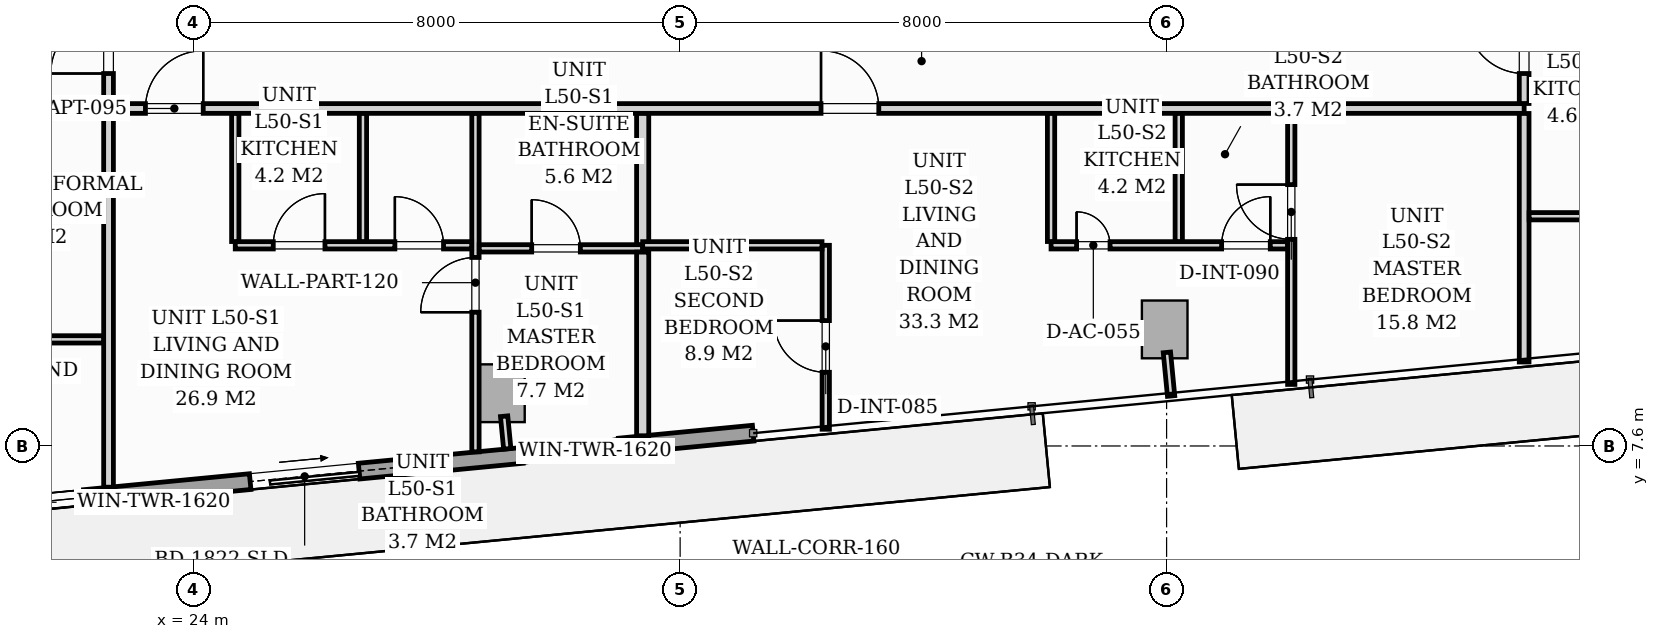
"""IFC4 building model, lengths in metres.
Left out: names, types, materials, properties, quantities, classifications, styles, units other than length and angle.
Written with IfcOpenShell. Run it as: python <this file> out.ifc"""

import sys

from ifc_helpers import new_model, si_unit, direction, frame, frame_2d, origin, origin_2d, place, context, subcontext, project, spatial, rectangle, extrude, source, transform, mapped, element, fill, save


model = new_model("IFC4")
c1 = context("Model", 3, precision=1e-05, world=origin(), true_north=direction((0.0, 1.0)))
c2 = subcontext(c1, "Body", "Model", "MODEL_VIEW")
j1 = project(units=[si_unit("LENGTHUNIT", "METRE"), si_unit("PLANEANGLEUNIT", "RADIAN")], contexts=[c1])
p1 = place(None, origin())
s1 = spatial("IfcSite", under=j1, at=p1, CompositionType="ELEMENT")
p2 = place(p1, origin())
s2 = spatial("IfcBuilding", under=s1, at=p2, CompositionType="ELEMENT")
p3 = place(p2, frame((0.0, 0.0, 176.2)))
s3 = spatial("IfcBuildingStorey", under=s2, at=p3, CompositionType="ELEMENT", Elevation=176.2)
m1 = source(origin(), c2, "Body", "SweptSolid", [
    extrude(rectangle(XDim=0.75, YDim=0.95, at=origin_2d()), origin(), (0.0, 0.0, 1.0), 3.196),
])
for number, where, z_axis, x_axis in (
    (1, (29.069, 8.467, 0.002), (0.0, 0.0, 1.0), (0.995, 0.096, 0.0)),
    (2, (39.969, 9.517, 0.002), (0.0, 0.0, 1.0), (0.995, 0.096, 0.0)),
):
    element("IfcColumn", number, at=place(p3, frame(where, z_axis=z_axis, x_axis=x_axis)), inside=s3, PredefinedType="COLUMN", context=c2, shape_type="MappedRepresentation", body=[
        mapped(m1, transform((0.0, 0.0, 0.0), scale=1.0)),
    ])
p4 = place(p3, frame((33.201, 7.81, 0.0), z_axis=(0.0, 0.0, 1.0), x_axis=(-0.995397074604, -0.095836652014, 0.0)))
e3 = element("IfcWall", 3, at=p4, inside=s3, PredefinedType="STANDARD", context=c2, shape_type="SweptSolid", body=[
    extrude(rectangle(XDim=16.1, YDim=0.26, at=frame_2d((8.05, 0.0))), origin(), (0.0, 0.0, 1.0), 2.94),
])
p5 = place(p4, frame((6.51, 0.0, 0.0)))
e4 = element("IfcOpeningElement", 4, at=p5, cuts=e3, PredefinedType="OPENING", context=c2, shape_type="SweptSolid", body=[
    extrude(rectangle(XDim=1.8, YDim=2.06, at=frame_2d((0.9, 1.03))), frame((0.0, 0.14, 0.0), z_axis=(0.0, -1.0, 0.0), x_axis=(1.0, 0.0, 0.0)), (0.0, 0.0, 1.0), 0.28),
])
p6 = place(p4, frame((11.05, 0.0, 0.65)))
e5 = element("IfcOpeningElement", 5, at=p6, cuts=e3, PredefinedType="OPENING", context=c2, shape_type="SweptSolid", body=[
    extrude(rectangle(XDim=1.6, YDim=1.5, at=frame_2d((0.8, 0.75))), frame((0.0, 0.14, 0.0), z_axis=(0.0, -1.0, 0.0), x_axis=(1.0, 0.0, 0.0)), (0.0, 0.0, 1.0), 0.28),
])
p7 = place(p4, frame((2.213, 0.0, 0.75)))
e6 = element("IfcOpeningElement", 6, at=p7, cuts=e3, PredefinedType="OPENING", context=c2, shape_type="SweptSolid", body=[
    extrude(rectangle(XDim=1.6, YDim=1.5, at=frame_2d((0.8, 0.75))), frame((0.0, 0.14, 0.0), z_axis=(0.0, -1.0, 0.0), x_axis=(1.0, 0.0, 0.0)), (0.0, 0.0, 1.0), 0.28),
])
p8 = place(p3, frame((22.6, 13.15, 0.0), z_axis=(0.0, 0.0, 1.0), x_axis=(1.0, 0.0, 0.0)))
e7 = element("IfcWall", 7, at=p8, inside=s3, PredefinedType="PARTITIONING", context=c2, shape_type="SweptSolid", body=[
    extrude(rectangle(XDim=23.28, YDim=0.16, at=frame_2d((11.64, 0.0))), origin(), (0.0, 0.0, 1.0), 2.94),
])
p9 = place(p8, frame((0.607, 0.0, 0.0)))
e8 = element("IfcOpeningElement", 8, at=p9, cuts=e7, PredefinedType="OPENING", context=c2, shape_type="SweptSolid", body=[
    extrude(rectangle(XDim=0.95, YDim=2.06, at=frame_2d((0.475, 1.03))), frame((0.0, 0.09, 0.0), z_axis=(0.0, -1.0, 0.0), x_axis=(1.0, 0.0, 0.0)), (0.0, 0.0, 1.0), 0.18),
])
p10 = place(p8, frame((11.717, 0.0, 0.0)))
e9 = element("IfcOpeningElement", 9, at=p10, cuts=e7, PredefinedType="OPENING", context=c2, shape_type="SweptSolid", body=[
    extrude(rectangle(XDim=0.95, YDim=2.06, at=frame_2d((0.475, 1.03))), frame((0.0, 0.09, 0.0), z_axis=(0.0, -1.0, 0.0), x_axis=(1.0, 0.0, 0.0)), (0.0, 0.0, 1.0), 0.18),
])
p11 = place(p3, frame((22.6, 6.922, 0.0), z_axis=(0.0, 0.0, 1.0), x_axis=(0.0, 1.0, 0.0)))
e10 = element("IfcWall", 10, at=p11, inside=s3, PredefinedType="PARTITIONING", context=c2, shape_type="SweptSolid", body=[
    extrude(rectangle(XDim=6.146, YDim=0.16, at=frame_2d((3.073, 0.0))), origin(), (0.0, 0.0, 1.0), 2.94),
])
p12 = place(p3, frame((22.6, 13.232, 0.0), z_axis=(0.0, 0.0, 1.0), x_axis=(0.0, 1.0, 0.0)))
e11 = element("IfcWall", 11, at=p12, inside=s3, PredefinedType="PARTITIONING", context=c2, shape_type="SweptSolid", body=[
    extrude(rectangle(XDim=11.649, YDim=0.16, at=frame_2d((5.824, 0.0))), origin(), (0.0, 0.0, 1.0), 2.94),
])
p13 = place(p12, frame((0.493, 0.0, 0.0)))
e12 = element("IfcOpeningElement", 12, at=p13, cuts=e11, PredefinedType="OPENING", context=c2, shape_type="SweptSolid", body=[
    extrude(rectangle(XDim=0.95, YDim=2.06, at=frame_2d((0.475, 1.03))), frame((0.0, 0.09, 0.0), z_axis=(0.0, -1.0, 0.0), x_axis=(1.0, 0.0, 0.0)), (0.0, 0.0, 1.0), 0.18),
])
p14 = place(p3, frame((45.88, 8.981, 0.0), z_axis=(0.0, 0.0, 1.0), x_axis=(0.0, 1.0, 0.0)))
e13 = element("IfcWall", 13, at=p14, inside=s3, PredefinedType="PARTITIONING", context=c2, shape_type="SweptSolid", body=[
    extrude(rectangle(XDim=4.087, YDim=0.16, at=frame_2d((2.043, 0.0))), origin(), (0.0, 0.0, 1.0), 2.94),
])
p15 = place(p3, frame((45.88, 13.232, 0.0), z_axis=(0.0, 0.0, 1.0), x_axis=(0.0, 1.0, 0.0)))
e14 = element("IfcWall", 14, at=p15, inside=s3, PredefinedType="PARTITIONING", context=c2, shape_type="SweptSolid", body=[
    extrude(rectangle(XDim=4.57, YDim=0.16, at=frame_2d((2.285, 0.0))), origin(), (0.0, 0.0, 1.0), 2.94),
])
p16 = place(p15, frame((0.493, 0.0, 0.0)))
e15 = element("IfcOpeningElement", 15, at=p16, cuts=e14, PredefinedType="OPENING", context=c2, shape_type="SweptSolid", body=[
    extrude(rectangle(XDim=0.95, YDim=2.06, at=frame_2d((0.475, 1.03))), frame((0.0, 0.09, 0.0), z_axis=(0.0, -1.0, 0.0), x_axis=(1.0, 0.0, 0.0)), (0.0, 0.0, 1.0), 0.18),
])
p17 = place(p3, frame((28.634, 7.503, 0.0), z_axis=(0.0, 0.0, 1.0), x_axis=(0.0, 1.0, 0.0)))
e16 = element("IfcWall", 16, at=p17, inside=s3, PredefinedType="PARTITIONING", context=c2, shape_type="SweptSolid", body=[
    extrude(rectangle(XDim=5.565, YDim=0.12, at=frame_2d((2.782, 0.0))), origin(), (0.0, 0.0, 1.0), 2.94),
])
p18 = place(p17, frame((2.297, 0.0, 0.0)))
e17 = element("IfcOpeningElement", 17, at=p18, cuts=e16, PredefinedType="OPENING", context=c2, shape_type="SweptSolid", body=[
    extrude(rectangle(XDim=0.9, YDim=2.05, at=frame_2d((0.45, 1.025))), frame((0.0, 0.07, 0.0), z_axis=(0.0, -1.0, 0.0), x_axis=(1.0, 0.0, 0.0)), (0.0, 0.0, 1.0), 0.14),
])
p19 = place(p3, frame((24.684, 10.9, 0.0), z_axis=(0.0, 0.0, 1.0), x_axis=(1.0, 0.0, 0.0)))
e18 = element("IfcWall", 18, at=p19, inside=s3, PredefinedType="PARTITIONING", context=c2, shape_type="SweptSolid", body=[
    extrude(rectangle(XDim=3.888, YDim=0.12, at=frame_2d((1.944, 0.0))), origin(), (0.0, 0.0, 1.0), 2.94),
])
p20 = place(p19, frame((0.625, 0.0, 0.0)))
e19 = element("IfcOpeningElement", 19, at=p20, cuts=e18, PredefinedType="OPENING", context=c2, shape_type="SweptSolid", body=[
    extrude(rectangle(XDim=0.85, YDim=2.05, at=frame_2d((0.425, 1.025))), frame((0.0, 0.07, 0.0), z_axis=(0.0, -1.0, 0.0), x_axis=(1.0, 0.0, 0.0)), (0.0, 0.0, 1.0), 0.14),
])
p21 = place(p19, frame((2.625, 0.0, 0.0)))
e20 = element("IfcOpeningElement", 20, at=p21, cuts=e18, PredefinedType="OPENING", context=c2, shape_type="SweptSolid", body=[
    extrude(rectangle(XDim=0.8, YDim=2.02, at=frame_2d((0.4, 1.01))), frame((0.0, 0.07, 0.0), z_axis=(0.0, -1.0, 0.0), x_axis=(1.0, 0.0, 0.0)), (0.0, 0.0, 1.0), 0.14),
])
for number, where, z_axis, x_axis in (
    (21, (26.784, 10.962, 0.0), (0.0, 0.0, 1.0), (0.0, 1.0, 0.0)),
    (22, (24.684, 10.962, 0.0), (0.0, 0.0, 1.0), (0.0, 1.0, 0.0)),
):
    element("IfcWall", number, at=place(p3, frame(where, z_axis=z_axis, x_axis=x_axis)), inside=s3, PredefinedType="PARTITIONING", context=c2, shape_type="SweptSolid", body=[
        extrude(rectangle(XDim=2.106, YDim=0.12, at=frame_2d((1.053, 0.0))), origin(), (0.0, 0.0, 1.0), 2.94),
    ])
p22 = place(p3, frame((28.696, 10.85, 0.0), z_axis=(0.0, 0.0, 1.0), x_axis=(1.0, 0.0, 0.0)))
e23 = element("IfcWall", 23, at=p22, inside=s3, PredefinedType="PARTITIONING", context=c2, shape_type="SweptSolid", body=[
    extrude(rectangle(XDim=2.688, YDim=0.12, at=frame_2d((1.344, 0.0))), origin(), (0.0, 0.0, 1.0), 2.94),
])
p23 = place(p22, frame((0.863, 0.0, 0.0)))
e24 = element("IfcOpeningElement", 24, at=p23, cuts=e23, PredefinedType="OPENING", context=c2, shape_type="SweptSolid", body=[
    extrude(rectangle(XDim=0.8, YDim=2.02, at=frame_2d((0.4, 1.01))), frame((0.0, 0.07, 0.0), z_axis=(0.0, -1.0, 0.0), x_axis=(1.0, 0.0, 0.0)), (0.0, 0.0, 1.0), 0.14),
])
p24 = place(p3, frame((31.384, 7.768, 0.0), z_axis=(0.0, 0.0, 1.0), x_axis=(0.0, 1.0, 0.0)))
e25 = element("IfcWall", 25, at=p24, inside=s3, PredefinedType="PARTITIONING", context=c2, shape_type="SweptSolid", body=[
    extrude(rectangle(XDim=3.02, YDim=0.2, at=frame_2d((1.51, 0.0))), origin(), (0.0, 0.0, 1.0), 2.94),
])
p25 = place(p3, frame((31.384, 10.912, 0.0), z_axis=(0.0, 0.0, 1.0), x_axis=(0.0, 1.0, 0.0)))
e26 = element("IfcWall", 26, at=p25, inside=s3, PredefinedType="PARTITIONING", context=c2, shape_type="SweptSolid", body=[
    extrude(rectangle(XDim=2.156, YDim=0.2, at=frame_2d((1.078, 0.0))), origin(), (0.0, 0.0, 1.0), 2.94),
])
p26 = place(p3, frame((42.05, 8.612, 0.0), z_axis=(0.0, 0.0, 1.0), x_axis=(0.0, 1.0, 0.0)))
e27 = element("IfcWall", 27, at=p26, inside=s3, PredefinedType="PARTITIONING", context=c2, shape_type="SweptSolid", body=[
    extrude(rectangle(XDim=4.456, YDim=0.12, at=frame_2d((2.228, 0.0))), origin(), (0.0, 0.0, 1.0), 2.94),
])
p27 = place(p26, frame((2.386, 0.0, 0.0)))
e28 = element("IfcOpeningElement", 28, at=p27, cuts=e27, PredefinedType="OPENING", context=c2, shape_type="SweptSolid", body=[
    extrude(rectangle(XDim=0.9, YDim=2.05, at=frame_2d((0.45, 1.025))), frame((0.0, 0.07, 0.0), z_axis=(0.0, -1.0, 0.0), x_axis=(1.0, 0.0, 0.0)), (0.0, 0.0, 1.0), 0.14),
])
p28 = place(p3, frame((38.1, 10.9, 0.0), z_axis=(0.0, 0.0, 1.0), x_axis=(1.0, 0.0, 0.0)))
e29 = element("IfcWall", 29, at=p28, inside=s3, PredefinedType="PARTITIONING", context=c2, shape_type="SweptSolid", body=[
    extrude(rectangle(XDim=3.888, YDim=0.12, at=frame_2d((1.944, 0.0))), origin(), (0.0, 0.0, 1.0), 2.94),
])
p29 = place(p28, frame((0.42, 0.0, 0.0)))
e30 = element("IfcOpeningElement", 30, at=p29, cuts=e29, PredefinedType="OPENING", context=c2, shape_type="SweptSolid", body=[
    extrude(rectangle(XDim=0.55, YDim=2.0, at=frame_2d((0.275, 1.0))), frame((0.0, 0.07, 0.0), z_axis=(0.0, -1.0, 0.0), x_axis=(1.0, 0.0, 0.0)), (0.0, 0.0, 1.0), 0.14),
])
p30 = place(p28, frame((2.805, 0.0, 0.0)))
e31 = element("IfcOpeningElement", 31, at=p30, cuts=e29, PredefinedType="OPENING", context=c2, shape_type="SweptSolid", body=[
    extrude(rectangle(XDim=0.8, YDim=2.02, at=frame_2d((0.4, 1.01))), frame((0.0, 0.07, 0.0), z_axis=(0.0, -1.0, 0.0), x_axis=(1.0, 0.0, 0.0)), (0.0, 0.0, 1.0), 0.14),
])
for number, where, z_axis, x_axis in (
    (32, (40.2, 10.962, 0.0), (0.0, 0.0, 1.0), (0.0, 1.0, 0.0)),
    (33, (38.1, 10.962, 0.0), (0.0, 0.0, 1.0), (0.0, 1.0, 0.0)),
):
    element("IfcWall", number, at=place(p3, frame(where, z_axis=z_axis, x_axis=x_axis)), inside=s3, PredefinedType="PARTITIONING", context=c2, shape_type="SweptSolid", body=[
        extrude(rectangle(XDim=2.106, YDim=0.12, at=frame_2d((1.053, 0.0))), origin(), (0.0, 0.0, 1.0), 2.94),
    ])
p31 = place(p3, frame((34.395, 7.875, 0.0), z_axis=(0.0, 0.0, 1.0), x_axis=(0.0, 1.0, 0.0)))
e34 = element("IfcWall", 34, at=p31, inside=s3, PredefinedType="PARTITIONING", context=c2, shape_type="SweptSolid", body=[
    extrude(rectangle(XDim=3.025, YDim=0.12, at=frame_2d((1.512, 0.0))), origin(), (0.0, 0.0, 1.0), 2.94),
])
p32 = place(p31, frame((0.937, 0.0, 0.0)))
e35 = element("IfcOpeningElement", 35, at=p32, cuts=e34, PredefinedType="OPENING", context=c2, shape_type="SweptSolid", body=[
    extrude(rectangle(XDim=0.85, YDim=2.05, at=frame_2d((0.425, 1.025))), frame((0.0, 0.07, 0.0), z_axis=(0.0, -1.0, 0.0), x_axis=(1.0, 0.0, 0.0)), (0.0, 0.0, 1.0), 0.14),
])
p33 = place(p3, frame((31.384, 10.9, 0.0), z_axis=(0.0, 0.0, 1.0), x_axis=(1.0, 0.0, 0.0)))
e36 = element("IfcWall", 36, at=p33, inside=s3, PredefinedType="PARTITIONING", context=c2, shape_type="SweptSolid", body=[
    extrude(rectangle(XDim=2.949, YDim=0.12, at=frame_2d((1.475, 0.0))), origin(), (0.0, 0.0, 1.0), 2.94),
])
p34 = place(p3, frame((14.447, 9.353, 0.0), z_axis=(0.0, 0.0, 1.0), x_axis=(1.0, 0.0, 0.0)))
e37 = element("IfcWall", 37, at=p34, inside=s3, PredefinedType="PARTITIONING", context=c2, shape_type="SweptSolid", body=[
    extrude(rectangle(XDim=8.071, YDim=0.12, at=frame_2d((4.036, 0.0))), origin(), (0.0, 0.0, 1.0), 2.94),
])
p35 = place(p34, frame((4.42, 0.0, 0.0)))
e38 = element("IfcOpeningElement", 38, at=p35, cuts=e37, PredefinedType="OPENING", context=c2, shape_type="SweptSolid", body=[
    extrude(rectangle(XDim=0.85, YDim=2.05, at=frame_2d((0.425, 1.025))), frame((0.0, 0.07, 0.0), z_axis=(0.0, -1.0, 0.0), x_axis=(1.0, 0.0, 0.0)), (0.0, 0.0, 1.0), 0.14),
])
p36 = place(p3, frame((14.233, 11.578, 0.0), z_axis=(0.0, 0.0, 1.0), x_axis=(1.0, 0.0, 0.0)))
e39 = element("IfcWall", 39, at=p36, inside=s3, PredefinedType="PARTITIONING", context=c2, shape_type="SweptSolid", body=[
    extrude(rectangle(XDim=8.285, YDim=0.12, at=frame_2d((4.143, 0.0))), origin(), (0.0, 0.0, 1.0), 2.94),
])
p37 = place(p36, frame((3.711, 0.0, 0.0)))
e40 = element("IfcOpeningElement", 40, at=p37, cuts=e39, PredefinedType="OPENING", context=c2, shape_type="SweptSolid", body=[
    extrude(rectangle(XDim=0.85, YDim=2.05, at=frame_2d((0.425, 1.025))), frame((0.0, 0.07, 0.0), z_axis=(0.0, -1.0, 0.0), x_axis=(1.0, 0.0, 0.0)), (0.0, 0.0, 1.0), 0.14),
])
p38 = place(p3, frame((45.962, 11.378, 0.0), z_axis=(0.0, 0.0, 1.0), x_axis=(1.0, 0.0, 0.0)))
e41 = element("IfcWall", 41, at=p38, inside=s3, PredefinedType="PARTITIONING", context=c2, shape_type="SweptSolid", body=[
    extrude(rectangle(XDim=16.671, YDim=0.12, at=frame_2d((8.335, 0.0))), origin(), (0.0, 0.0, 1.0), 2.383),
])
p39 = place(p38, frame((6.186, 0.0, 0.0)))
e42 = element("IfcOpeningElement", 42, at=p39, cuts=e41, PredefinedType="OPENING", context=c2, shape_type="SweptSolid", body=[
    extrude(rectangle(XDim=0.85, YDim=2.05, at=frame_2d((0.425, 1.025))), frame((0.0, 0.07, 0.0), z_axis=(0.0, -1.0, 0.0), x_axis=(1.0, 0.0, 0.0)), (0.0, 0.0, 1.0), 0.14),
])
p40 = place(p3, frame((29.105, 8.089, 0.0), z_axis=(0.0, 0.0, 1.0), x_axis=(0.095772948675, -0.995403205893, 0.0)))
e43 = element("IfcWall", 43, at=p40, inside=s3, PredefinedType="PARTITIONING", context=c2, shape_type="SweptSolid", body=[
    extrude(rectangle(XDim=0.538, YDim=0.12, at=frame_2d((0.269, 0.0))), origin(), (0.0, 0.0, 1.0), 2.94),
])
p41 = place(p3, frame((40.005, 9.139, 0.0), z_axis=(0.0, 0.0, 1.0), x_axis=(0.095977354523, -0.995383517755, 0.0)))
e44 = element("IfcWall", 44, at=p41, inside=s3, PredefinedType="PARTITIONING", context=c2, shape_type="SweptSolid", body=[
    extrude(rectangle(XDim=0.72, YDim=0.12, at=frame_2d((0.36, 0.0))), origin(), (0.0, 0.0, 1.0), 2.94),
])
m2 = source(origin(), c2, "Body", "SweptSolid", [
    extrude(rectangle(XDim=1.8, YDim=2.06, at=frame_2d((0.9, 1.03))), frame((0.0, 0.025, 0.0), z_axis=(0.0, -1.0, 0.0), x_axis=(1.0, 0.0, 0.0)), (0.0, 0.0, 1.0), 0.05),
])
p42 = place(p5, origin())
e45 = element("IfcDoor", 45, at=p42, inside=s3, OperationType="SLIDING_TO_LEFT", PredefinedType="DOOR", context=c2, shape_type="MappedRepresentation", body=[
    mapped(m2, transform((0.0, 0.0, 0.0), scale=1.0)),
])
fill(e4, e45)
m3 = source(origin(), c2, "Body", "SweptSolid", [
    extrude(rectangle(XDim=1.6, YDim=1.5, at=frame_2d((0.8, 0.75))), frame((0.0, 0.03, 0.0), z_axis=(0.0, -1.0, 0.0), x_axis=(1.0, 0.0, 0.0)), (0.0, 0.0, 1.0), 0.06),
])
p43 = place(p6, origin())
e46 = element("IfcWindow", 46, at=p43, inside=s3, PartitioningType="SINGLE_PANEL", PredefinedType="WINDOW", context=c2, shape_type="MappedRepresentation", body=[
    mapped(m3, transform((0.0, 0.0, 0.0), scale=1.0)),
])
fill(e5, e46)
p44 = place(p7, origin())
e47 = element("IfcWindow", 47, at=p44, inside=s3, PartitioningType="SINGLE_PANEL", PredefinedType="WINDOW", context=c2, shape_type="MappedRepresentation", body=[
    mapped(m3, transform((0.0, 0.0, 0.0), scale=1.0)),
])
fill(e6, e47)
m4 = source(origin(), c2, "Body", "SweptSolid", [
    extrude(rectangle(XDim=0.8, YDim=2.02, at=frame_2d((0.4, 1.01))), frame((0.0, 0.025, 0.0), z_axis=(0.0, -1.0, 0.0), x_axis=(1.0, 0.0, 0.0)), (0.0, 0.0, 1.0), 0.05),
])
p45 = place(p23, origin())
e48 = element("IfcDoor", 48, at=p45, inside=s3, OperationType="SINGLE_SWING_LEFT", PredefinedType="DOOR", context=c2, shape_type="MappedRepresentation", body=[
    mapped(m4, transform((0.0, 0.0, 0.0), scale=1.0)),
])
fill(e24, e48)
m5 = source(origin(), c2, "Body", "SweptSolid", [
    extrude(rectangle(XDim=0.95, YDim=2.06, at=frame_2d((0.475, 1.03))), frame((0.0, 0.025, 0.0), z_axis=(0.0, -1.0, 0.0), x_axis=(1.0, 0.0, 0.0)), (0.0, 0.0, 1.0), 0.05),
])
p46 = place(p9, origin())
e49 = element("IfcDoor", 49, at=p46, inside=s3, OperationType="SINGLE_SWING_RIGHT", PredefinedType="DOOR", context=c2, shape_type="MappedRepresentation", body=[
    mapped(m5, transform((0.0, 0.0, 0.0), scale=1.0)),
])
fill(e8, e49)
m6 = source(origin(), c2, "Body", "SweptSolid", [
    extrude(rectangle(XDim=0.9, YDim=2.05, at=frame_2d((0.45, 1.025))), frame((0.0, 0.025, 0.0), z_axis=(0.0, -1.0, 0.0), x_axis=(1.0, 0.0, 0.0)), (0.0, 0.0, 1.0), 0.05),
])
p47 = place(p18, origin())
e50 = element("IfcDoor", 50, at=p47, inside=s3, OperationType="SINGLE_SWING_LEFT", PredefinedType="DOOR", context=c2, shape_type="MappedRepresentation", body=[
    mapped(m6, transform((0.0, 0.0, 0.0), scale=1.0)),
])
fill(e17, e50)
m7 = source(origin(), c2, "Body", "SweptSolid", [
    extrude(rectangle(XDim=0.85, YDim=2.05, at=frame_2d((0.425, 1.025))), frame((0.0, 0.025, 0.0), z_axis=(0.0, -1.0, 0.0), x_axis=(1.0, 0.0, 0.0)), (0.0, 0.0, 1.0), 0.05),
])
p48 = place(p20, origin())
e51 = element("IfcDoor", 51, at=p48, inside=s3, OperationType="SINGLE_SWING_RIGHT", PredefinedType="DOOR", context=c2, shape_type="MappedRepresentation", body=[
    mapped(m7, transform((0.0, 0.0, 0.0), scale=1.0)),
])
fill(e19, e51)
p49 = place(p21, origin())
e52 = element("IfcDoor", 52, at=p49, inside=s3, OperationType="SINGLE_SWING_LEFT", PredefinedType="DOOR", context=c2, shape_type="MappedRepresentation", body=[
    mapped(m4, transform((0.0, 0.0, 0.0), scale=1.0)),
])
fill(e20, e52)
p50 = place(p32, origin())
e53 = element("IfcDoor", 53, at=p50, inside=s3, OperationType="SINGLE_SWING_RIGHT", PredefinedType="DOOR", context=c2, shape_type="MappedRepresentation", body=[
    mapped(m7, transform((0.0, 0.0, 0.0), scale=1.0)),
])
fill(e35, e53)
p51 = place(p10, origin())
e54 = element("IfcDoor", 54, at=p51, inside=s3, OperationType="SINGLE_SWING_LEFT", PredefinedType="DOOR", context=c2, shape_type="MappedRepresentation", body=[
    mapped(m5, transform((0.0, 0.0, 0.0), scale=1.0)),
])
fill(e9, e54)
p52 = place(p27, origin())
e55 = element("IfcDoor", 55, at=p52, inside=s3, OperationType="SINGLE_SWING_RIGHT", PredefinedType="DOOR", context=c2, shape_type="MappedRepresentation", body=[
    mapped(m6, transform((0.0, 0.0, 0.0), scale=1.0)),
])
fill(e28, e55)
m8 = source(origin(), c2, "Body", "SweptSolid", [
    extrude(rectangle(XDim=0.55, YDim=2.0, at=frame_2d((0.275, 1.0))), frame((0.0, 0.025, 0.0), z_axis=(0.0, -1.0, 0.0), x_axis=(1.0, 0.0, 0.0)), (0.0, 0.0, 1.0), 0.05),
])
p53 = place(p29, origin())
e56 = element("IfcDoor", 56, at=p53, inside=s3, OperationType="SINGLE_SWING_LEFT", PredefinedType="DOOR", context=c2, shape_type="MappedRepresentation", body=[
    mapped(m8, transform((0.0, 0.0, 0.0), scale=1.0)),
])
fill(e30, e56)
p54 = place(p30, origin())
e57 = element("IfcDoor", 57, at=p54, inside=s3, OperationType="SINGLE_SWING_RIGHT", PredefinedType="DOOR", context=c2, shape_type="MappedRepresentation", body=[
    mapped(m4, transform((0.0, 0.0, 0.0), scale=1.0)),
])
fill(e31, e57)
p55 = place(p13, origin())
e58 = element("IfcDoor", 58, at=p55, inside=s3, OperationType="SINGLE_SWING_LEFT", PredefinedType="DOOR", context=c2, shape_type="MappedRepresentation", body=[
    mapped(m5, transform((0.0, 0.0, 0.0), scale=1.0)),
])
fill(e12, e58)
p56 = place(p16, origin())
e59 = element("IfcDoor", 59, at=p56, inside=s3, OperationType="SINGLE_SWING_RIGHT", PredefinedType="DOOR", context=c2, shape_type="MappedRepresentation", body=[
    mapped(m5, transform((0.0, 0.0, 0.0), scale=1.0)),
])
fill(e15, e59)
save(model, sys.argv[1])
